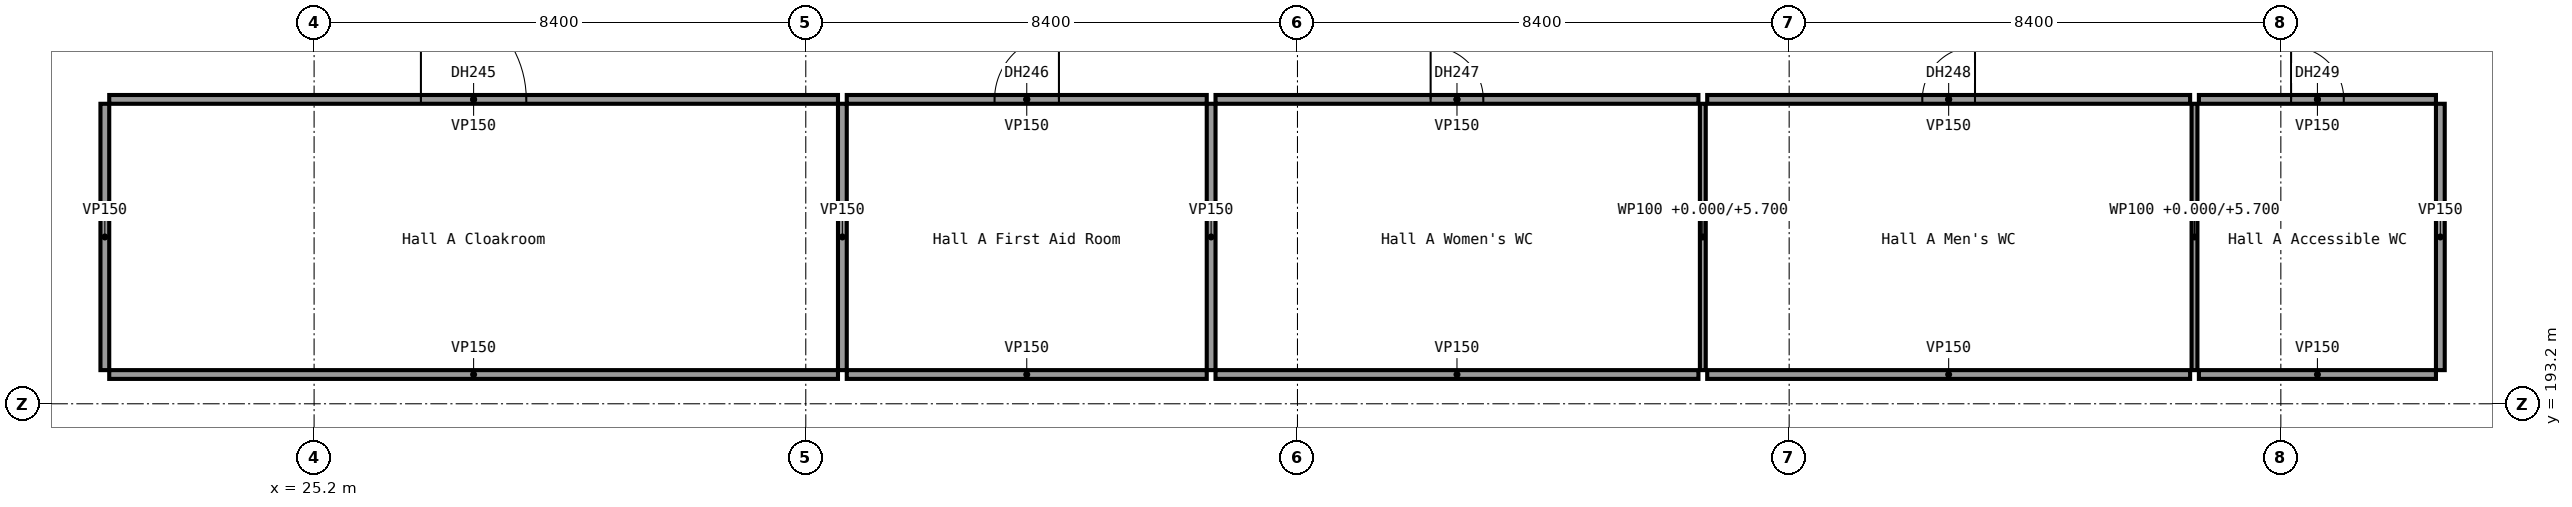
"""IFC4 building model, lengths in metres.
Left out: names, types, materials, properties, quantities, classifications, styles, units other than length and angle.
Written with IfcOpenShell. Run it as: python <this file> out.ifc"""

import sys

from ifc_helpers import new_model, si_unit, direction, frame, frame_2d, origin, place, context, subcontext, project, spatial, rectangle, extrude, element, fill, save


model = new_model("IFC4")
c1 = context("Model", 3, precision=1e-05, world=origin(), true_north=direction((0.0, 1.0)))
c2 = subcontext(c1, "Body", "Model", "MODEL_VIEW")
j1 = project(units=[si_unit("LENGTHUNIT", "METRE"), si_unit("PLANEANGLEUNIT", "RADIAN")], contexts=[c1])
p1 = place(None, origin())
s1 = spatial("IfcSite", under=j1, at=p1, CompositionType="ELEMENT")
p2 = place(p1, origin())
s2 = spatial("IfcBuilding", under=s1, at=p2, CompositionType="ELEMENT")
p3 = place(p2, origin())
s3 = spatial("IfcBuildingStorey", under=s2, at=p3, CompositionType="ELEMENT", Elevation=0.0)
p4 = place(p3, frame((21.7, 193.7, 0.0), z_axis=(0.0, 0.0, 1.0), x_axis=(1.0, 0.0, 0.0)))
e1 = element("IfcWall", 1, at=p4, inside=s3, PredefinedType="PARTITIONING", context=c2, shape_type="SweptSolid", body=[
    extrude(rectangle(XDim=12.45, YDim=0.15, at=frame_2d((6.225, 0.0))), origin(), (0.0, 0.0, 1.0), 5.7),
])
p5 = place(p3, frame((21.7, 198.4, 0.0), z_axis=(0.0, 0.0, 1.0), x_axis=(1.0, 0.0, 0.0)))
e2 = element("IfcWall", 2, at=p5, inside=s3, PredefinedType="PARTITIONING", context=c2, shape_type="SweptSolid", body=[
    extrude(rectangle(XDim=12.45, YDim=0.15, at=frame_2d((6.225, 0.0))), origin(), (0.0, 0.0, 1.0), 5.7),
])
p6 = place(p5, frame((5.325, 0.0, 0.0)))
e3 = element("IfcOpeningElement", 3, at=p6, cuts=e2, PredefinedType="OPENING", context=c2, shape_type="SweptSolid", body=[
    extrude(rectangle(XDim=1.8, YDim=2.1, at=frame_2d((0.9, 1.05))), frame((0.0, 0.075, 0.0), z_axis=(0.0, -1.0, 0.0), x_axis=(1.0, 0.0, 0.0)), (0.0, 0.0, 1.0), 0.15),
])
p7 = place(p3, frame((34.3, 193.7, 0.0), z_axis=(0.0, 0.0, 1.0), x_axis=(1.0, 0.0, 0.0)))
e4 = element("IfcWall", 4, at=p7, inside=s3, PredefinedType="PARTITIONING", context=c2, shape_type="SweptSolid", body=[
    extrude(rectangle(XDim=6.15, YDim=0.15, at=frame_2d((3.075, 0.0))), origin(), (0.0, 0.0, 1.0), 5.7),
])
p8 = place(p3, frame((34.3, 198.4, 0.0), z_axis=(0.0, 0.0, 1.0), x_axis=(1.0, 0.0, 0.0)))
e5 = element("IfcWall", 5, at=p8, inside=s3, PredefinedType="PARTITIONING", context=c2, shape_type="SweptSolid", body=[
    extrude(rectangle(XDim=6.15, YDim=0.15, at=frame_2d((3.075, 0.0))), origin(), (0.0, 0.0, 1.0), 5.7),
])
p9 = place(p8, frame((2.525, 0.0, 0.0)))
e6 = element("IfcOpeningElement", 6, at=p9, cuts=e5, PredefinedType="OPENING", context=c2, shape_type="SweptSolid", body=[
    extrude(rectangle(XDim=1.1, YDim=2.1, at=frame_2d((0.55, 1.05))), frame((0.0, 0.075, 0.0), z_axis=(0.0, -1.0, 0.0), x_axis=(1.0, 0.0, 0.0)), (0.0, 0.0, 1.0), 0.15),
])
p10 = place(p3, frame((40.6, 193.7, 0.0), z_axis=(0.0, 0.0, 1.0), x_axis=(1.0, 0.0, 0.0)))
e7 = element("IfcWall", 7, at=p10, inside=s3, PredefinedType="PARTITIONING", context=c2, shape_type="SweptSolid", body=[
    extrude(rectangle(XDim=8.25, YDim=0.15, at=frame_2d((4.125, 0.0))), origin(), (0.0, 0.0, 1.0), 5.7),
])
p11 = place(p3, frame((40.6, 198.4, 0.0), z_axis=(0.0, 0.0, 1.0), x_axis=(1.0, 0.0, 0.0)))
e8 = element("IfcWall", 8, at=p11, inside=s3, PredefinedType="PARTITIONING", context=c2, shape_type="SweptSolid", body=[
    extrude(rectangle(XDim=8.25, YDim=0.15, at=frame_2d((4.125, 0.0))), origin(), (0.0, 0.0, 1.0), 5.7),
])
p12 = place(p11, frame((3.675, 0.0, 0.0)))
e9 = element("IfcOpeningElement", 9, at=p12, cuts=e8, PredefinedType="OPENING", context=c2, shape_type="SweptSolid", body=[
    extrude(rectangle(XDim=0.9, YDim=2.1, at=frame_2d((0.45, 1.05))), frame((0.0, 0.075, 0.0), z_axis=(0.0, -1.0, 0.0), x_axis=(1.0, 0.0, 0.0)), (0.0, 0.0, 1.0), 0.15),
])
p13 = place(p3, frame((49.0, 193.7, 0.0), z_axis=(0.0, 0.0, 1.0), x_axis=(1.0, 0.0, 0.0)))
e10 = element("IfcWall", 10, at=p13, inside=s3, PredefinedType="PARTITIONING", context=c2, shape_type="SweptSolid", body=[
    extrude(rectangle(XDim=8.25, YDim=0.15, at=frame_2d((4.125, 0.0))), origin(), (0.0, 0.0, 1.0), 5.7),
])
p14 = place(p3, frame((49.0, 198.4, 0.0), z_axis=(0.0, 0.0, 1.0), x_axis=(1.0, 0.0, 0.0)))
e11 = element("IfcWall", 11, at=p14, inside=s3, PredefinedType="PARTITIONING", context=c2, shape_type="SweptSolid", body=[
    extrude(rectangle(XDim=8.25, YDim=0.15, at=frame_2d((4.125, 0.0))), origin(), (0.0, 0.0, 1.0), 5.7),
])
p15 = place(p14, frame((3.675, 0.0, 0.0)))
e12 = element("IfcOpeningElement", 12, at=p15, cuts=e11, PredefinedType="OPENING", context=c2, shape_type="SweptSolid", body=[
    extrude(rectangle(XDim=0.9, YDim=2.1, at=frame_2d((0.45, 1.05))), frame((0.0, 0.075, 0.0), z_axis=(0.0, -1.0, 0.0), x_axis=(1.0, 0.0, 0.0)), (0.0, 0.0, 1.0), 0.15),
])
p16 = place(p3, frame((57.4, 193.7, 0.0), z_axis=(0.0, 0.0, 1.0), x_axis=(1.0, 0.0, 0.0)))
e13 = element("IfcWall", 13, at=p16, inside=s3, PredefinedType="PARTITIONING", context=c2, shape_type="SweptSolid", body=[
    extrude(rectangle(XDim=4.05, YDim=0.15, at=frame_2d((2.025, 0.0))), origin(), (0.0, 0.0, 1.0), 5.7),
])
p17 = place(p3, frame((57.4, 198.4, 0.0), z_axis=(0.0, 0.0, 1.0), x_axis=(1.0, 0.0, 0.0)))
e14 = element("IfcWall", 14, at=p17, inside=s3, PredefinedType="PARTITIONING", context=c2, shape_type="SweptSolid", body=[
    extrude(rectangle(XDim=4.05, YDim=0.15, at=frame_2d((2.025, 0.0))), origin(), (0.0, 0.0, 1.0), 5.7),
])
p18 = place(p17, frame((1.575, 0.0, 0.0)))
e15 = element("IfcOpeningElement", 15, at=p18, cuts=e14, PredefinedType="OPENING", context=c2, shape_type="SweptSolid", body=[
    extrude(rectangle(XDim=0.9, YDim=2.1, at=frame_2d((0.45, 1.05))), frame((0.0, 0.075, 0.0), z_axis=(0.0, -1.0, 0.0), x_axis=(1.0, 0.0, 0.0)), (0.0, 0.0, 1.0), 0.15),
])
for number, where, z_axis, x_axis in (
    (16, (21.625, 193.775, 0.0), (0.0, 0.0, 1.0), (0.0, 1.0, 0.0)),
    (17, (34.225, 193.775, 0.0), (0.0, 0.0, 1.0), (0.0, 1.0, 0.0)),
    (18, (40.525, 193.775, 0.0), (0.0, 0.0, 1.0), (0.0, 1.0, 0.0)),
):
    element("IfcWall", number, at=place(p3, frame(where, z_axis=z_axis, x_axis=x_axis)), inside=s3, PredefinedType="PARTITIONING", context=c2, shape_type="SweptSolid", body=[
        extrude(rectangle(XDim=4.55, YDim=0.15, at=frame_2d((2.275, 0.0))), origin(), (0.0, 0.0, 1.0), 5.7),
    ])
for number, where, z_axis, x_axis in (
    (19, (48.925, 193.775, 0.0), (0.0, 0.0, 1.0), (0.0, 1.0, 0.0)),
    (20, (57.325, 193.775, 0.0), (0.0, 0.0, 1.0), (0.0, 1.0, 0.0)),
):
    element("IfcWall", number, at=place(p3, frame(where, z_axis=z_axis, x_axis=x_axis)), inside=s3, PredefinedType="PARTITIONING", context=c2, shape_type="SweptSolid", body=[
        extrude(rectangle(XDim=4.55, YDim=0.1, at=frame_2d((2.275, 0.0))), origin(), (0.0, 0.0, 1.0), 5.7),
    ])
p19 = place(p3, frame((61.525, 193.775, 0.0), z_axis=(0.0, 0.0, 1.0), x_axis=(0.0, 1.0, 0.0)))
e21 = element("IfcWall", 21, at=p19, inside=s3, PredefinedType="PARTITIONING", context=c2, shape_type="SweptSolid", body=[
    extrude(rectangle(XDim=4.55, YDim=0.15, at=frame_2d((2.275, 0.0))), origin(), (0.0, 0.0, 1.0), 5.7),
])
p20 = place(p6, origin())
e22 = element("IfcDoor", 22, at=p20, inside=s3, OperationType="DOUBLE_DOOR_SINGLE_SWING", PredefinedType="DOOR", context=c2, shape_type="SweptSolid", body=[
    extrude(rectangle(XDim=1.8, YDim=2.1, at=frame_2d((0.9, 1.05))), frame((0.0, 0.025, 0.0), z_axis=(0.0, -1.0, 0.0), x_axis=(1.0, 0.0, 0.0)), (0.0, 0.0, 1.0), 0.05),
])
fill(e3, e22)
p21 = place(p9, origin())
e23 = element("IfcDoor", 23, at=p21, inside=s3, OperationType="SINGLE_SWING_LEFT", PredefinedType="DOOR", context=c2, shape_type="SweptSolid", body=[
    extrude(rectangle(XDim=1.1, YDim=2.1, at=frame_2d((0.55, 1.05))), frame((0.0, 0.025, 0.0), z_axis=(0.0, -1.0, 0.0), x_axis=(1.0, 0.0, 0.0)), (0.0, 0.0, 1.0), 0.05),
])
fill(e6, e23)
p22 = place(p12, origin())
e24 = element("IfcDoor", 24, at=p22, inside=s3, OperationType="SINGLE_SWING_RIGHT", PredefinedType="DOOR", context=c2, shape_type="SweptSolid", body=[
    extrude(rectangle(XDim=0.9, YDim=2.1, at=frame_2d((0.45, 1.05))), frame((0.0, 0.025, 0.0), z_axis=(0.0, -1.0, 0.0), x_axis=(1.0, 0.0, 0.0)), (0.0, 0.0, 1.0), 0.05),
])
fill(e9, e24)
p23 = place(p15, origin())
e25 = element("IfcDoor", 25, at=p23, inside=s3, OperationType="SINGLE_SWING_LEFT", PredefinedType="DOOR", context=c2, shape_type="SweptSolid", body=[
    extrude(rectangle(XDim=0.9, YDim=2.1, at=frame_2d((0.45, 1.05))), frame((0.0, 0.025, 0.0), z_axis=(0.0, -1.0, 0.0), x_axis=(1.0, 0.0, 0.0)), (0.0, 0.0, 1.0), 0.05),
])
fill(e12, e25)
p24 = place(p18, origin())
e26 = element("IfcDoor", 26, at=p24, inside=s3, OperationType="SINGLE_SWING_RIGHT", PredefinedType="DOOR", context=c2, shape_type="SweptSolid", body=[
    extrude(rectangle(XDim=0.9, YDim=2.1, at=frame_2d((0.45, 1.05))), frame((0.0, 0.025, 0.0), z_axis=(0.0, -1.0, 0.0), x_axis=(1.0, 0.0, 0.0)), (0.0, 0.0, 1.0), 0.05),
])
fill(e15, e26)
save(model, sys.argv[1])
